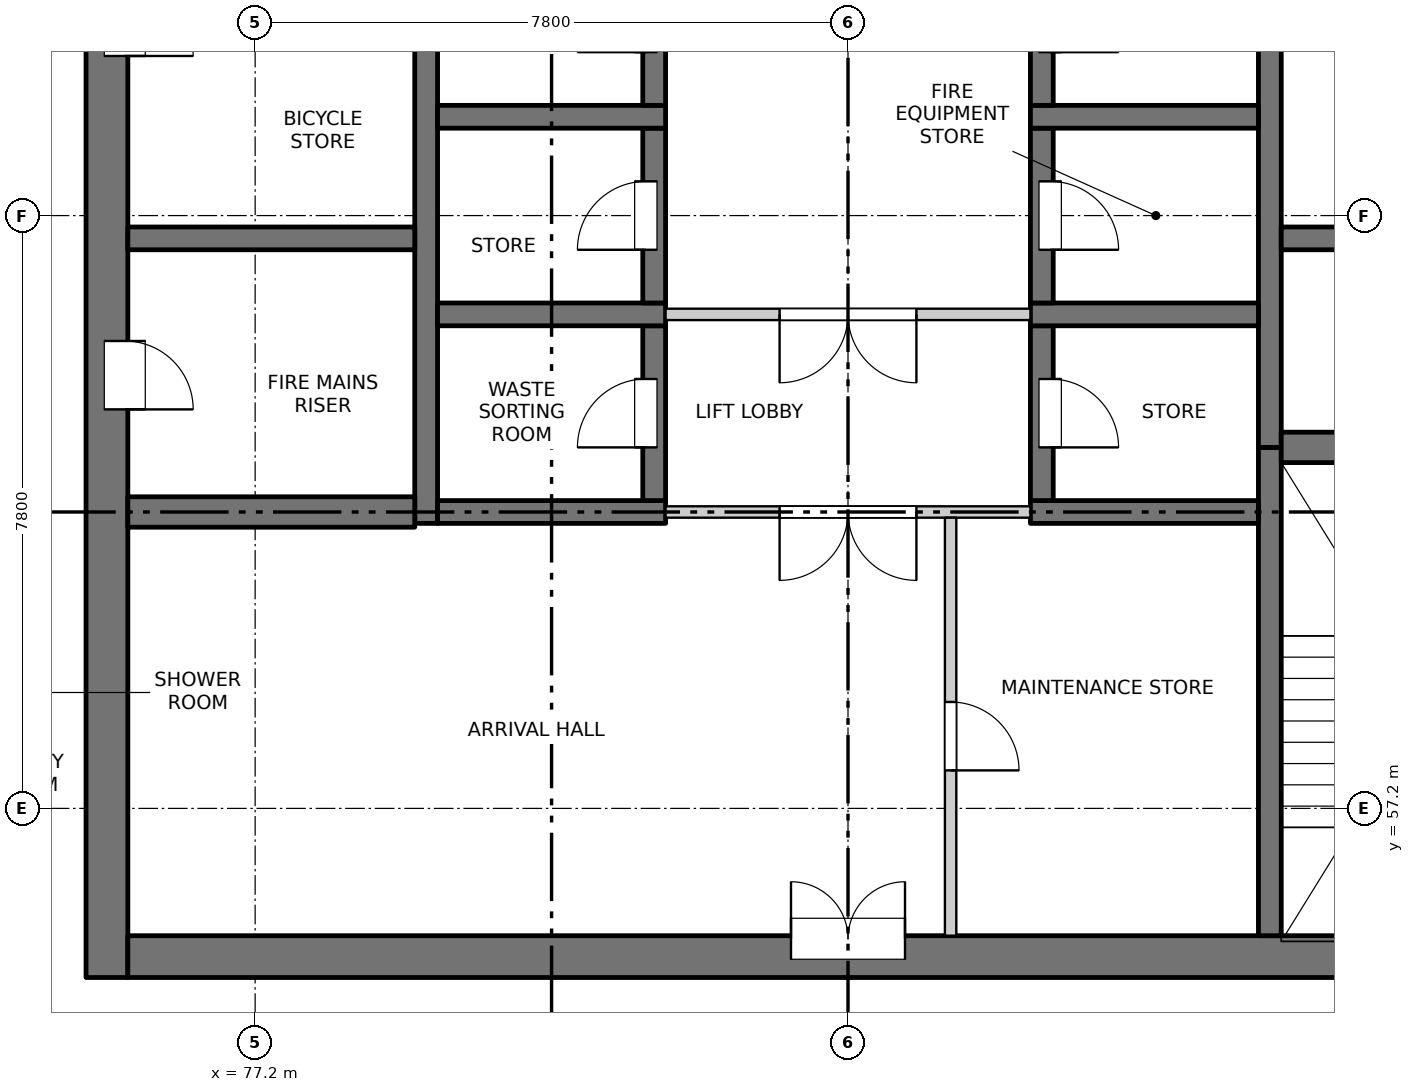
"""IFC4 building model, lengths in metres.
Left out: names, types, materials, properties, quantities, classifications, styles, units other than length and angle.
Written with IfcOpenShell. Run it as: python <this file> out.ifc"""

import sys

from ifc_helpers import new_model, si_unit, direction, frame, frame_2d, origin, place, context, subcontext, project, spatial, rectangle, extrude, element, fill, save


model = new_model("IFC4")
c1 = context("Model", 3, precision=1e-05, world=origin(), true_north=direction((0.0, 1.0)))
c2 = subcontext(c1, "Body", "Model", "MODEL_VIEW")
j1 = project(units=[si_unit("LENGTHUNIT", "METRE"), si_unit("PLANEANGLEUNIT", "RADIAN")], contexts=[c1])
p1 = place(None, origin())
s1 = spatial("IfcSite", under=j1, at=p1, CompositionType="ELEMENT")
p2 = place(p1, origin())
s2 = spatial("IfcBuilding", under=s1, at=p2, CompositionType="ELEMENT")
p3 = place(p2, frame((0.0, 0.0, 158.8)))
s3 = spatial("IfcBuildingStorey", under=s2, at=p3, CompositionType="ELEMENT", Elevation=158.8)
p4 = place(p3, frame((75.25, 54.975, -0.25), z_axis=(0.0, 0.0, 1.0), x_axis=(0.0, 1.0, 0.0)))
e1 = element("IfcWall", 1, at=p4, inside=s3, PredefinedType="SOLIDWALL", context=c2, shape_type="SweptSolid", body=[
    extrude(rectangle(XDim=22.325, YDim=0.55, at=frame_2d((11.163, 0.0))), origin(), (0.0, 0.0, 1.0), 3.4),
])
p5 = place(p4, frame((7.475, 0.0, 0.25)))
e2 = element("IfcOpeningElement", 2, at=p5, cuts=e1, PredefinedType="OPENING", context=c2, shape_type="SweptSolid", body=[
    extrude(rectangle(XDim=0.9, YDim=2.1, at=frame_2d((0.45, 1.05))), frame((0.0, 0.285, 0.0), z_axis=(0.0, -1.0, 0.0), x_axis=(1.0, 0.0, 0.0)), (0.0, 0.0, 1.0), 0.57),
])
p6 = place(p4, frame((12.125, 0.0, 0.25)))
e3 = element("IfcOpeningElement", 3, at=p6, cuts=e1, PredefinedType="OPENING", context=c2, shape_type="SweptSolid", body=[
    extrude(rectangle(XDim=0.9, YDim=2.1, at=frame_2d((0.45, 1.05))), frame((0.0, 0.285, 0.0), z_axis=(0.0, -1.0, 0.0), x_axis=(1.0, 0.0, 0.0)), (0.0, 0.0, 1.0), 0.57),
])
p7 = place(p4, frame((16.625, 0.0, 0.25)))
e4 = element("IfcOpeningElement", 4, at=p7, cuts=e1, PredefinedType="OPENING", context=c2, shape_type="SweptSolid", body=[
    extrude(rectangle(XDim=0.9, YDim=2.1, at=frame_2d((0.45, 1.05))), frame((0.0, 0.285, 0.0), z_axis=(0.0, -1.0, 0.0), x_axis=(1.0, 0.0, 0.0)), (0.0, 0.0, 1.0), 0.57),
])
p8 = place(p4, frame((20.075, 0.0, 0.25)))
e5 = element("IfcOpeningElement", 5, at=p8, cuts=e1, PredefinedType="OPENING", context=c2, shape_type="SweptSolid", body=[
    extrude(rectangle(XDim=0.9, YDim=2.1, at=frame_2d((0.45, 1.05))), frame((0.0, 0.285, 0.0), z_axis=(0.0, -1.0, 0.0), x_axis=(1.0, 0.0, 0.0)), (0.0, 0.0, 1.0), 0.57),
])
p9 = place(p3, frame((75.525, 55.25, -0.25), z_axis=(0.0, 0.0, 1.0), x_axis=(1.0, 0.0, 0.0)))
e6 = element("IfcWall", 6, at=p9, inside=s3, PredefinedType="SOLIDWALL", context=c2, shape_type="SweptSolid", body=[
    extrude(rectangle(XDim=18.95, YDim=0.55, at=frame_2d((9.475, 0.0))), origin(), (0.0, 0.0, 1.0), 3.4),
])
p10 = place(p9, frame((8.725, 0.0, 0.25)))
e7 = element("IfcOpeningElement", 7, at=p10, cuts=e6, PredefinedType="OPENING", context=c2, shape_type="SweptSolid", body=[
    extrude(rectangle(XDim=1.5, YDim=2.1, at=frame_2d((0.75, 1.05))), frame((0.0, 0.285, 0.0), z_axis=(0.0, -1.0, 0.0), x_axis=(1.0, 0.0, 0.0)), (0.0, 0.0, 1.0), 0.57),
])
p11 = place(p3, frame((79.45, 60.95, -0.25), z_axis=(0.0, 0.0, 1.0), x_axis=(0.0, 1.0, 0.0)))
e8 = element("IfcWall", 8, at=p11, inside=s3, PredefinedType="SOLIDWALL", context=c2, shape_type="SweptSolid", body=[
    extrude(rectangle(XDim=16.35, YDim=0.3, at=frame_2d((8.175, 0.0))), origin(), (0.0, 0.0, 1.0), 3.4),
])
p12 = place(p3, frame((90.55, 55.525, -0.25), z_axis=(0.0, 0.0, 1.0), x_axis=(0.0, 1.0, 0.0)))
e9 = element("IfcWall", 9, at=p12, inside=s3, PredefinedType="SOLIDWALL", context=c2, shape_type="SweptSolid", body=[
    extrude(rectangle(XDim=6.425, YDim=0.3, at=frame_2d((3.212, 0.0))), origin(), (0.0, 0.0, 1.0), 3.4),
])
p13 = place(p3, frame((90.55, 61.95, -0.25), z_axis=(0.0, 0.0, 1.0), x_axis=(0.0, 1.0, 0.0)))
e10 = element("IfcWall", 10, at=p13, inside=s3, PredefinedType="SOLIDWALL", context=c2, shape_type="SweptSolid", body=[
    extrude(rectangle(XDim=15.35, YDim=0.3, at=frame_2d((7.675, 0.0))), origin(), (0.0, 0.0, 1.0), 3.4),
])
p14 = place(p3, frame((79.6, 61.1, -0.25), z_axis=(0.0, 0.0, 1.0), x_axis=(1.0, 0.0, 0.0)))
e11 = element("IfcWall", 11, at=p14, inside=s3, PredefinedType="SOLIDWALL", context=c2, shape_type="SweptSolid", body=[
    extrude(rectangle(XDim=3.0, YDim=0.3, at=frame_2d((1.5, 0.0))), origin(), (0.0, 0.0, 1.0), 3.4),
])
p15 = place(p3, frame((82.45, 61.25, -0.25), z_axis=(0.0, 0.0, 1.0), x_axis=(0.0, 1.0, 0.0)))
e12 = element("IfcWall", 12, at=p15, inside=s3, PredefinedType="SOLIDWALL", context=c2, shape_type="SweptSolid", body=[
    extrude(rectangle(XDim=2.3, YDim=0.3, at=frame_2d((1.15, 0.0))), origin(), (0.0, 0.0, 1.0), 3.4),
])
p16 = place(p15, frame((0.7, 0.0, 0.25)))
e13 = element("IfcOpeningElement", 13, at=p16, cuts=e12, PredefinedType="OPENING", context=c2, shape_type="SweptSolid", body=[
    extrude(rectangle(XDim=0.9, YDim=2.1, at=frame_2d((0.45, 1.05))), frame((0.0, 0.16, 0.0), z_axis=(0.0, -1.0, 0.0), x_axis=(1.0, 0.0, 0.0)), (0.0, 0.0, 1.0), 0.32),
])
p17 = place(p3, frame((79.6, 63.7, -0.25), z_axis=(0.0, 0.0, 1.0), x_axis=(1.0, 0.0, 0.0)))
e14 = element("IfcWall", 14, at=p17, inside=s3, PredefinedType="SOLIDWALL", context=c2, shape_type="SweptSolid", body=[
    extrude(rectangle(XDim=3.0, YDim=0.3, at=frame_2d((1.5, 0.0))), origin(), (0.0, 0.0, 1.0), 3.4),
])
p18 = place(p3, frame((82.45, 63.85, -0.25), z_axis=(0.0, 0.0, 1.0), x_axis=(0.0, 1.0, 0.0)))
e15 = element("IfcWall", 15, at=p18, inside=s3, PredefinedType="SOLIDWALL", context=c2, shape_type="SweptSolid", body=[
    extrude(rectangle(XDim=2.3, YDim=0.3, at=frame_2d((1.15, 0.0))), origin(), (0.0, 0.0, 1.0), 3.4),
])
p19 = place(p18, frame((0.7, 0.0, 0.25)))
e16 = element("IfcOpeningElement", 16, at=p19, cuts=e15, PredefinedType="OPENING", context=c2, shape_type="SweptSolid", body=[
    extrude(rectangle(XDim=0.9, YDim=2.1, at=frame_2d((0.45, 1.05))), frame((0.0, 0.16, 0.0), z_axis=(0.0, -1.0, 0.0), x_axis=(1.0, 0.0, 0.0)), (0.0, 0.0, 1.0), 0.32),
])
p20 = place(p3, frame((79.6, 66.3, -0.25), z_axis=(0.0, 0.0, 1.0), x_axis=(1.0, 0.0, 0.0)))
e17 = element("IfcWall", 17, at=p20, inside=s3, PredefinedType="SOLIDWALL", context=c2, shape_type="SweptSolid", body=[
    extrude(rectangle(XDim=3.0, YDim=0.3, at=frame_2d((1.5, 0.0))), origin(), (0.0, 0.0, 1.0), 3.4),
])
p21 = place(p3, frame((82.45, 66.45, -0.25), z_axis=(0.0, 0.0, 1.0), x_axis=(0.0, 1.0, 0.0)))
e18 = element("IfcWall", 18, at=p21, inside=s3, PredefinedType="SOLIDWALL", context=c2, shape_type="SweptSolid", body=[
    extrude(rectangle(XDim=2.3, YDim=0.3, at=frame_2d((1.15, 0.0))), origin(), (0.0, 0.0, 1.0), 3.4),
])
p22 = place(p21, frame((0.7, 0.0, 0.25)))
e19 = element("IfcOpeningElement", 19, at=p22, cuts=e18, PredefinedType="OPENING", context=c2, shape_type="SweptSolid", body=[
    extrude(rectangle(XDim=0.9, YDim=2.1, at=frame_2d((0.45, 1.05))), frame((0.0, 0.16, 0.0), z_axis=(0.0, -1.0, 0.0), x_axis=(1.0, 0.0, 0.0)), (0.0, 0.0, 1.0), 0.32),
])
p23 = place(p3, frame((87.4, 61.1, -0.25), z_axis=(0.0, 0.0, 1.0), x_axis=(1.0, 0.0, 0.0)))
e20 = element("IfcWall", 20, at=p23, inside=s3, PredefinedType="SOLIDWALL", context=c2, shape_type="SweptSolid", body=[
    extrude(rectangle(XDim=3.0, YDim=0.3, at=frame_2d((1.5, 0.0))), origin(), (0.0, 0.0, 1.0), 3.4),
])
p24 = place(p3, frame((87.55, 61.25, -0.25), z_axis=(0.0, 0.0, 1.0), x_axis=(0.0, 1.0, 0.0)))
e21 = element("IfcWall", 21, at=p24, inside=s3, PredefinedType="SOLIDWALL", context=c2, shape_type="SweptSolid", body=[
    extrude(rectangle(XDim=2.3, YDim=0.3, at=frame_2d((1.15, 0.0))), origin(), (0.0, 0.0, 1.0), 3.4),
])
p25 = place(p24, frame((0.7, 0.0, 0.25)))
e22 = element("IfcOpeningElement", 22, at=p25, cuts=e21, PredefinedType="OPENING", context=c2, shape_type="SweptSolid", body=[
    extrude(rectangle(XDim=0.9, YDim=2.1, at=frame_2d((0.45, 1.05))), frame((0.0, 0.16, 0.0), z_axis=(0.0, -1.0, 0.0), x_axis=(1.0, 0.0, 0.0)), (0.0, 0.0, 1.0), 0.32),
])
p26 = place(p3, frame((87.4, 63.7, -0.25), z_axis=(0.0, 0.0, 1.0), x_axis=(1.0, 0.0, 0.0)))
e23 = element("IfcWall", 23, at=p26, inside=s3, PredefinedType="SOLIDWALL", context=c2, shape_type="SweptSolid", body=[
    extrude(rectangle(XDim=3.0, YDim=0.3, at=frame_2d((1.5, 0.0))), origin(), (0.0, 0.0, 1.0), 3.4),
])
p27 = place(p3, frame((87.55, 63.85, -0.25), z_axis=(0.0, 0.0, 1.0), x_axis=(0.0, 1.0, 0.0)))
e24 = element("IfcWall", 24, at=p27, inside=s3, PredefinedType="SOLIDWALL", context=c2, shape_type="SweptSolid", body=[
    extrude(rectangle(XDim=2.3, YDim=0.3, at=frame_2d((1.15, 0.0))), origin(), (0.0, 0.0, 1.0), 3.4),
])
p28 = place(p27, frame((0.7, 0.0, 0.25)))
e25 = element("IfcOpeningElement", 25, at=p28, cuts=e24, PredefinedType="OPENING", context=c2, shape_type="SweptSolid", body=[
    extrude(rectangle(XDim=0.9, YDim=2.1, at=frame_2d((0.45, 1.05))), frame((0.0, 0.16, 0.0), z_axis=(0.0, -1.0, 0.0), x_axis=(1.0, 0.0, 0.0)), (0.0, 0.0, 1.0), 0.32),
])
p29 = place(p3, frame((87.4, 66.3, -0.25), z_axis=(0.0, 0.0, 1.0), x_axis=(1.0, 0.0, 0.0)))
e26 = element("IfcWall", 26, at=p29, inside=s3, PredefinedType="SOLIDWALL", context=c2, shape_type="SweptSolid", body=[
    extrude(rectangle(XDim=3.0, YDim=0.3, at=frame_2d((1.5, 0.0))), origin(), (0.0, 0.0, 1.0), 3.4),
])
p30 = place(p3, frame((87.55, 66.45, -0.25), z_axis=(0.0, 0.0, 1.0), x_axis=(0.0, 1.0, 0.0)))
e27 = element("IfcWall", 27, at=p30, inside=s3, PredefinedType="SOLIDWALL", context=c2, shape_type="SweptSolid", body=[
    extrude(rectangle(XDim=2.3, YDim=0.3, at=frame_2d((1.15, 0.0))), origin(), (0.0, 0.0, 1.0), 3.4),
])
p31 = place(p30, frame((0.7, 0.0, 0.25)))
e28 = element("IfcOpeningElement", 28, at=p31, cuts=e27, PredefinedType="OPENING", context=c2, shape_type="SweptSolid", body=[
    extrude(rectangle(XDim=0.9, YDim=2.1, at=frame_2d((0.45, 1.05))), frame((0.0, 0.16, 0.0), z_axis=(0.0, -1.0, 0.0), x_axis=(1.0, 0.0, 0.0)), (0.0, 0.0, 1.0), 0.32),
])
p32 = place(p3, frame((75.525, 61.1, -0.25), z_axis=(0.0, 0.0, 1.0), x_axis=(1.0, 0.0, 0.0)))
e29 = element("IfcWall", 29, at=p32, inside=s3, PredefinedType="SOLIDWALL", context=c2, shape_type="SweptSolid", body=[
    extrude(rectangle(XDim=3.775, YDim=0.4, at=frame_2d((1.888, 0.0))), origin(), (0.0, 0.0, 1.0), 3.4),
])
p33 = place(p3, frame((75.525, 64.7, -0.25), z_axis=(0.0, 0.0, 1.0), x_axis=(1.0, 0.0, 0.0)))
e30 = element("IfcWall", 30, at=p33, inside=s3, PredefinedType="SOLIDWALL", context=c2, shape_type="SweptSolid", body=[
    extrude(rectangle(XDim=3.775, YDim=0.3, at=frame_2d((1.888, 0.0))), origin(), (0.0, 0.0, 1.0), 3.4),
])
p34 = place(p3, frame((90.7, 61.95, -0.25), z_axis=(0.0, 0.0, 1.0), x_axis=(1.0, 0.0, 0.0)))
e31 = element("IfcWall", 31, at=p34, inside=s3, PredefinedType="SOLIDWALL", context=c2, shape_type="SweptSolid", body=[
    extrude(rectangle(XDim=3.775, YDim=0.4, at=frame_2d((1.888, 0.0))), origin(), (0.0, 0.0, 1.0), 3.4),
])
p35 = place(p3, frame((90.7, 64.7, -0.25), z_axis=(0.0, 0.0, 1.0), x_axis=(1.0, 0.0, 0.0)))
e32 = element("IfcWall", 32, at=p35, inside=s3, PredefinedType="SOLIDWALL", context=c2, shape_type="SweptSolid", body=[
    extrude(rectangle(XDim=3.775, YDim=0.3, at=frame_2d((1.888, 0.0))), origin(), (0.0, 0.0, 1.0), 3.4),
])
p36 = place(p3, frame((82.6, 61.1, 0.0), z_axis=(0.0, 0.0, 1.0), x_axis=(1.0, 0.0, 0.0)))
e33 = element("IfcWall", 33, at=p36, inside=s3, PredefinedType="PARTITIONING", context=c2, shape_type="SweptSolid", body=[
    extrude(rectangle(XDim=4.8, YDim=0.15, at=frame_2d((2.4, 0.0))), origin(), (0.0, 0.0, 1.0), 3.15),
])
p37 = place(p36, frame((1.5, 0.0, 0.0)))
e34 = element("IfcOpeningElement", 34, at=p37, cuts=e33, PredefinedType="OPENING", context=c2, shape_type="SweptSolid", body=[
    extrude(rectangle(XDim=1.8, YDim=2.1, at=frame_2d((0.9, 1.05))), frame((0.0, 0.085, 0.0), z_axis=(0.0, -1.0, 0.0), x_axis=(1.0, 0.0, 0.0)), (0.0, 0.0, 1.0), 0.17),
])
p38 = place(p3, frame((82.6, 63.7, 0.0), z_axis=(0.0, 0.0, 1.0), x_axis=(1.0, 0.0, 0.0)))
e35 = element("IfcWall", 35, at=p38, inside=s3, PredefinedType="PARTITIONING", context=c2, shape_type="SweptSolid", body=[
    extrude(rectangle(XDim=4.8, YDim=0.15, at=frame_2d((2.4, 0.0))), origin(), (0.0, 0.0, 1.0), 3.15),
])
p39 = place(p38, frame((1.5, 0.0, 0.0)))
e36 = element("IfcOpeningElement", 36, at=p39, cuts=e35, PredefinedType="OPENING", context=c2, shape_type="SweptSolid", body=[
    extrude(rectangle(XDim=1.8, YDim=2.1, at=frame_2d((0.9, 1.05))), frame((0.0, 0.085, 0.0), z_axis=(0.0, -1.0, 0.0), x_axis=(1.0, 0.0, 0.0)), (0.0, 0.0, 1.0), 0.17),
])
p40 = place(p3, frame((86.35, 55.525, 0.0), z_axis=(0.0, 0.0, 1.0), x_axis=(0.0, 1.0, 0.0)))
e37 = element("IfcWall", 37, at=p40, inside=s3, PredefinedType="PARTITIONING", context=c2, shape_type="SweptSolid", body=[
    extrude(rectangle(XDim=5.5, YDim=0.15, at=frame_2d((2.75, 0.0))), origin(), (0.0, 0.0, 1.0), 3.15),
])
p41 = place(p40, frame((2.175, 0.0, 0.0)))
e38 = element("IfcOpeningElement", 38, at=p41, cuts=e37, PredefinedType="OPENING", context=c2, shape_type="SweptSolid", body=[
    extrude(rectangle(XDim=0.9, YDim=2.1, at=frame_2d((0.45, 1.05))), frame((0.0, 0.085, 0.0), z_axis=(0.0, -1.0, 0.0), x_axis=(1.0, 0.0, 0.0)), (0.0, 0.0, 1.0), 0.17),
])
p42 = place(p10, origin())
e39 = element("IfcDoor", 39, at=p42, inside=s3, OperationType="DOUBLE_DOOR_SINGLE_SWING", PredefinedType="DOOR", context=c2, shape_type="SweptSolid", body=[
    extrude(rectangle(XDim=1.5, YDim=2.1, at=frame_2d((0.75, 1.05))), frame((0.0, 0.26, 0.0), z_axis=(0.0, -1.0, 0.0), x_axis=(1.0, 0.0, 0.0)), (0.0, 0.0, 1.0), 0.05),
])
fill(e7, e39)
p43 = place(p41, origin())
e40 = element("IfcDoor", 40, at=p43, inside=s3, OperationType="SINGLE_SWING_RIGHT", PredefinedType="DOOR", context=c2, shape_type="SweptSolid", body=[
    extrude(rectangle(XDim=0.9, YDim=2.1, at=frame_2d((0.45, 1.05))), frame((0.0, 0.025, 0.0), z_axis=(0.0, -1.0, 0.0), x_axis=(1.0, 0.0, 0.0)), (0.0, 0.0, 1.0), 0.05),
])
fill(e38, e40)
p44 = place(p37, origin())
e41 = element("IfcDoor", 41, at=p44, inside=s3, OperationType="DOUBLE_DOOR_SINGLE_SWING", PredefinedType="DOOR", context=c2, shape_type="SweptSolid", body=[
    extrude(rectangle(XDim=1.8, YDim=2.1, at=frame_2d((0.9, 1.05))), frame((0.0, 0.025, 0.0), z_axis=(0.0, -1.0, 0.0), x_axis=(1.0, 0.0, 0.0)), (0.0, 0.0, 1.0), 0.05),
])
fill(e34, e41)
p45 = place(p16, origin())
e42 = element("IfcDoor", 42, at=p45, inside=s3, OperationType="SINGLE_SWING_LEFT", PredefinedType="DOOR", context=c2, shape_type="SweptSolid", body=[
    extrude(rectangle(XDim=0.9, YDim=2.1, at=frame_2d((0.45, 1.05))), frame((0.0, 0.135, 0.0), z_axis=(0.0, -1.0, 0.0), x_axis=(1.0, 0.0, 0.0)), (0.0, 0.0, 1.0), 0.05),
])
fill(e13, e42)
p46 = place(p25, origin())
e43 = element("IfcDoor", 43, at=p46, inside=s3, OperationType="SINGLE_SWING_RIGHT", PredefinedType="DOOR", context=c2, shape_type="SweptSolid", body=[
    extrude(rectangle(XDim=0.9, YDim=2.1, at=frame_2d((0.45, 1.05))), frame((0.0, -0.085, 0.0), z_axis=(0.0, -1.0, 0.0), x_axis=(1.0, 0.0, 0.0)), (0.0, 0.0, 1.0), 0.05),
])
fill(e22, e43)
p47 = place(p5, origin())
e44 = element("IfcDoor", 44, at=p47, inside=s3, OperationType="SINGLE_SWING_RIGHT", PredefinedType="DOOR", context=c2, shape_type="SweptSolid", body=[
    extrude(rectangle(XDim=0.9, YDim=2.1, at=frame_2d((0.45, 1.05))), frame((0.0, -0.21, 0.0), z_axis=(0.0, -1.0, 0.0), x_axis=(1.0, 0.0, 0.0)), (0.0, 0.0, 1.0), 0.05),
])
fill(e2, e44)
p48 = place(p39, origin())
e45 = element("IfcDoor", 45, at=p48, inside=s3, OperationType="DOUBLE_DOOR_SINGLE_SWING", PredefinedType="DOOR", context=c2, shape_type="SweptSolid", body=[
    extrude(rectangle(XDim=1.8, YDim=2.1, at=frame_2d((0.9, 1.05))), frame((0.0, 0.025, 0.0), z_axis=(0.0, -1.0, 0.0), x_axis=(1.0, 0.0, 0.0)), (0.0, 0.0, 1.0), 0.05),
])
fill(e36, e45)
p49 = place(p19, origin())
e46 = element("IfcDoor", 46, at=p49, inside=s3, OperationType="SINGLE_SWING_LEFT", PredefinedType="DOOR", context=c2, shape_type="SweptSolid", body=[
    extrude(rectangle(XDim=0.9, YDim=2.1, at=frame_2d((0.45, 1.05))), frame((0.0, 0.135, 0.0), z_axis=(0.0, -1.0, 0.0), x_axis=(1.0, 0.0, 0.0)), (0.0, 0.0, 1.0), 0.05),
])
fill(e16, e46)
p50 = place(p28, origin())
e47 = element("IfcDoor", 47, at=p50, inside=s3, OperationType="SINGLE_SWING_RIGHT", PredefinedType="DOOR", context=c2, shape_type="SweptSolid", body=[
    extrude(rectangle(XDim=0.9, YDim=2.1, at=frame_2d((0.45, 1.05))), frame((0.0, -0.085, 0.0), z_axis=(0.0, -1.0, 0.0), x_axis=(1.0, 0.0, 0.0)), (0.0, 0.0, 1.0), 0.05),
])
fill(e25, e47)
p51 = place(p6, origin())
e48 = element("IfcDoor", 48, at=p51, inside=s3, OperationType="SINGLE_SWING_RIGHT", PredefinedType="DOOR", context=c2, shape_type="SweptSolid", body=[
    extrude(rectangle(XDim=0.9, YDim=2.1, at=frame_2d((0.45, 1.05))), frame((0.0, -0.21, 0.0), z_axis=(0.0, -1.0, 0.0), x_axis=(1.0, 0.0, 0.0)), (0.0, 0.0, 1.0), 0.05),
])
fill(e3, e48)
save(model, sys.argv[1])
